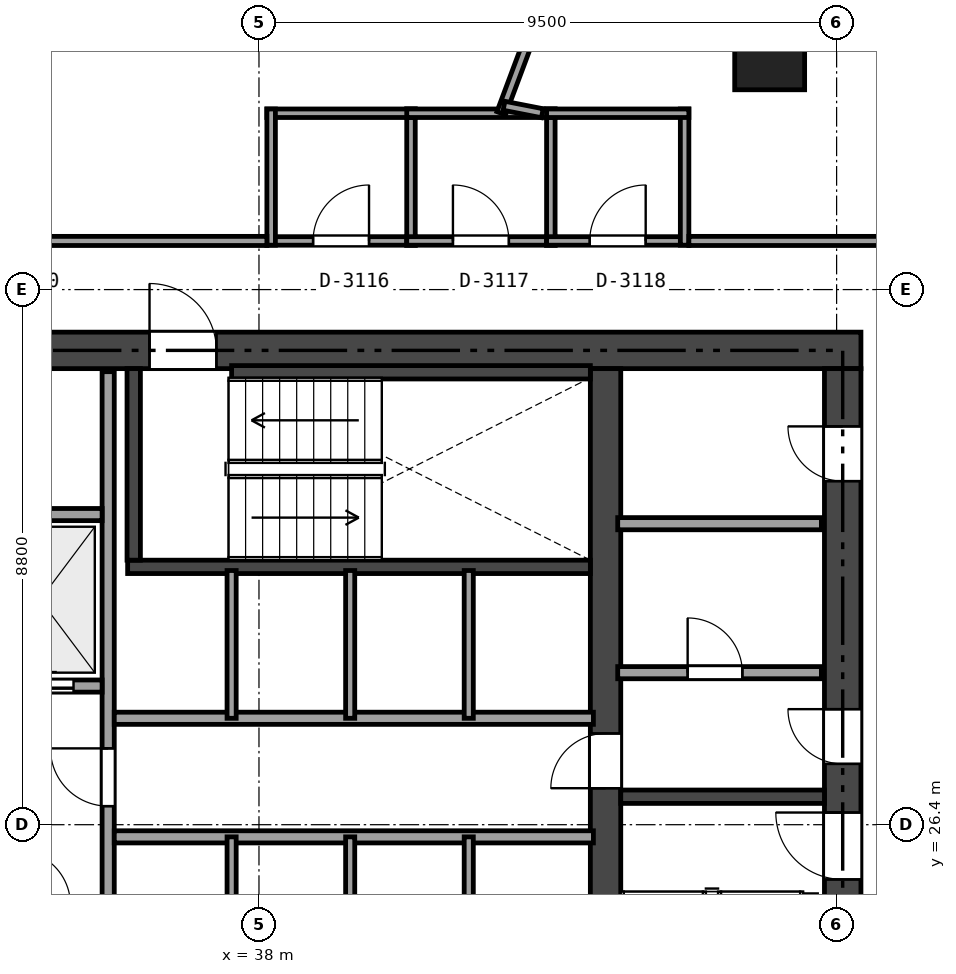
"""IFC4 building model, lengths in metres.
Left out: names, types, materials, properties, quantities, classifications, styles, units other than length and angle.
Written with IfcOpenShell. Run it as: python <this file> out.ifc"""

import sys

from ifc_helpers import new_model, si_unit, direction, frame, frame_2d, origin, origin_2d, place, context, subcontext, project, spatial, rectangle, extrude, element, fill, save


model = new_model("IFC4")
c1 = context("Model", 3, precision=1e-05, world=origin(), true_north=direction((0.0, 1.0)))
c2 = subcontext(c1, "Body", "Model", "MODEL_VIEW")
j1 = project(units=[si_unit("LENGTHUNIT", "METRE"), si_unit("PLANEANGLEUNIT", "RADIAN")], contexts=[c1])
p1 = place(None, origin())
s1 = spatial("IfcSite", under=j1, at=p1, CompositionType="ELEMENT")
p2 = place(p1, origin())
s2 = spatial("IfcBuilding", under=s1, at=p2, CompositionType="ELEMENT")
p3 = place(p2, frame((0.0, 0.0, 117.75)))
s3 = spatial("IfcBuildingStorey", under=s2, at=p3, CompositionType="ELEMENT", Elevation=117.75)
p4 = place(p3, frame((26.5, 34.2, 0.0), z_axis=(0.0, 0.0, 1.0), x_axis=(1.0, 0.0, 0.0)))
e1 = element("IfcWall", 1, at=p4, inside=s3, PredefinedType="SHEAR", context=c2, shape_type="SweptSolid", body=[
    extrude(rectangle(XDim=21.4, YDim=0.6, at=frame_2d((10.7, 0.0))), origin(), (0.0, 0.0, 1.0), 3.09),
])
p5 = place(p4, frame((9.7, 0.0, 0.0)))
e2 = element("IfcOpeningElement", 2, at=p5, cuts=e1, PredefinedType="OPENING", context=c2, shape_type="SweptSolid", body=[
    extrude(rectangle(XDim=1.1, YDim=2.15, at=frame_2d((0.55, 1.075))), frame((0.0, 0.31, 0.0), z_axis=(0.0, -1.0, 0.0), x_axis=(1.0, 0.0, 0.0)), (0.0, 0.0, 1.0), 0.62),
])
p6 = place(p4, frame((1.95, 0.0, 0.0)))
e3 = element("IfcOpeningElement", 3, at=p6, cuts=e1, PredefinedType="OPENING", context=c2, shape_type="SweptSolid", body=[
    extrude(rectangle(XDim=0.9, YDim=2.1, at=frame_2d((0.45, 1.05))), frame((0.0, 0.31, 0.0), z_axis=(0.0, -1.0, 0.0), x_axis=(1.0, 0.0, 0.0)), (0.0, 0.0, 1.0), 0.62),
])
p7 = place(p4, frame((6.25, 0.0, 0.0)))
e4 = element("IfcOpeningElement", 4, at=p7, cuts=e1, PredefinedType="OPENING", context=c2, shape_type="SweptSolid", body=[
    extrude(rectangle(XDim=0.9, YDim=2.1, at=frame_2d((0.45, 1.05))), frame((0.0, 0.31, 0.0), z_axis=(0.0, -1.0, 0.0), x_axis=(1.0, 0.0, 0.0)), (0.0, 0.0, 1.0), 0.62),
])
p8 = place(p3, frame((47.6, 18.9, 0.0), z_axis=(0.0, 0.0, 1.0), x_axis=(0.0, 1.0, 0.0)))
e5 = element("IfcWall", 5, at=p8, inside=s3, PredefinedType="SHEAR", context=c2, shape_type="SweptSolid", body=[
    extrude(rectangle(XDim=15.0, YDim=0.6, at=frame_2d((7.5, 0.0))), origin(), (0.0, 0.0, 1.0), 3.09),
])
p9 = place(p8, frame((6.6, 0.0, 0.0)))
e6 = element("IfcOpeningElement", 6, at=p9, cuts=e5, PredefinedType="OPENING", context=c2, shape_type="SweptSolid", body=[
    extrude(rectangle(XDim=1.1, YDim=2.15, at=frame_2d((0.55, 1.075))), frame((0.0, 0.31, 0.0), z_axis=(0.0, -1.0, 0.0), x_axis=(1.0, 0.0, 0.0)), (0.0, 0.0, 1.0), 0.62),
])
p10 = place(p8, frame((8.5, 0.0, 0.0)))
e7 = element("IfcOpeningElement", 7, at=p10, cuts=e5, PredefinedType="OPENING", context=c2, shape_type="SweptSolid", body=[
    extrude(rectangle(XDim=0.9, YDim=2.1, at=frame_2d((0.45, 1.05))), frame((0.0, 0.31, 0.0), z_axis=(0.0, -1.0, 0.0), x_axis=(1.0, 0.0, 0.0)), (0.0, 0.0, 1.0), 0.62),
])
p11 = place(p8, frame((13.15, 0.0, 0.0)))
e8 = element("IfcOpeningElement", 8, at=p11, cuts=e5, PredefinedType="OPENING", context=c2, shape_type="SweptSolid", body=[
    extrude(rectangle(XDim=0.9, YDim=2.1, at=frame_2d((0.45, 1.05))), frame((0.0, 0.31, 0.0), z_axis=(0.0, -1.0, 0.0), x_axis=(1.0, 0.0, 0.0)), (0.0, 0.0, 1.0), 0.62),
])
p12 = place(p3, frame((43.7, 18.9, 0.0), z_axis=(0.0, 0.0, 1.0), x_axis=(0.0, 1.0, 0.0)))
e9 = element("IfcWall", 9, at=p12, inside=s3, PredefinedType="SHEAR", context=c2, shape_type="SweptSolid", body=[
    extrude(rectangle(XDim=15.0, YDim=0.5, at=frame_2d((7.5, 0.0))), origin(), (0.0, 0.0, 1.0), 3.09),
])
p13 = place(p12, frame((8.1, 0.0, 0.0)))
e10 = element("IfcOpeningElement", 10, at=p13, cuts=e9, PredefinedType="OPENING", context=c2, shape_type="SweptSolid", body=[
    extrude(rectangle(XDim=0.9, YDim=2.1, at=frame_2d((0.45, 1.05))), frame((0.0, 0.26, 0.0), z_axis=(0.0, -1.0, 0.0), x_axis=(1.0, 0.0, 0.0)), (0.0, 0.0, 1.0), 0.52),
])
p14 = place(p3, frame((43.95, 26.86, 0.0), z_axis=(0.0, 0.0, 1.0), x_axis=(1.0, 0.0, 0.0)))
e11 = element("IfcWall", 11, at=p14, inside=s3, PredefinedType="SHEAR", context=c2, shape_type="SweptSolid", body=[
    extrude(rectangle(XDim=3.35, YDim=0.22, at=frame_2d((1.675, 0.0))), origin(), (0.0, 0.0, 1.0), 3.09),
])
p15 = place(p3, frame((35.84, 30.64, 0.0), z_axis=(0.0, 0.0, 1.0), x_axis=(1.0, 0.0, 0.0)))
e12 = element("IfcWall", 12, at=p15, inside=s3, PredefinedType="SHEAR", context=c2, shape_type="SweptSolid", body=[
    extrude(rectangle(XDim=7.61, YDim=0.22, at=frame_2d((3.805, 0.0))), origin(), (0.0, 0.0, 1.0), 3.09),
])
p16 = place(p3, frame((35.94, 30.75, 0.0), z_axis=(0.0, 0.0, 1.0), x_axis=(0.0, 1.0, 0.0)))
e13 = element("IfcWall", 13, at=p16, inside=s3, PredefinedType="SHEAR", context=c2, shape_type="SweptSolid", body=[
    extrude(rectangle(XDim=3.15, YDim=0.22, at=frame_2d((1.575, 0.0))), origin(), (0.0, 0.0, 1.0), 3.09),
])
p17 = place(p3, frame((37.55, 33.84, 0.0), z_axis=(0.0, 0.0, 1.0), x_axis=(1.0, 0.0, 0.0)))
e14 = element("IfcWall", 14, at=p17, inside=s3, PredefinedType="SHEAR", context=c2, shape_type="SweptSolid", body=[
    extrude(rectangle(XDim=5.9, YDim=0.22, at=frame_2d((2.95, 0.0))), origin(), (0.0, 0.0, 1.0), 3.09),
])
p18 = place(p3, frame((46.399, 39.061, 0.0), z_axis=(0.0, 0.0, 1.0), x_axis=(1.0, 0.0, 0.0)))
e15 = element("IfcColumn", 15, at=p18, inside=s3, PredefinedType="COLUMN", context=c2, shape_type="SweptSolid", body=[
    extrude(rectangle(XDim=1.15, YDim=1.15, at=origin_2d()), origin(), (0.0, 0.0, 1.0), 3.09),
])
p19 = place(p3, frame((43.9, 28.9, 0.0), z_axis=(0.0, 0.0, 1.0), x_axis=(1.0, 0.0, 0.0)))
e16 = element("IfcWall", 16, at=p19, inside=s3, PredefinedType="SOLIDWALL", context=c2, shape_type="SweptSolid", body=[
    extrude(rectangle(XDim=3.35, YDim=0.2, at=frame_2d((1.675, 0.0))), origin(), (0.0, 0.0, 1.0), 3.09),
])
p20 = place(p19, frame((1.15, 0.0, 0.0)))
e17 = element("IfcOpeningElement", 17, at=p20, cuts=e16, PredefinedType="OPENING", context=c2, shape_type="SweptSolid", body=[
    extrude(rectangle(XDim=0.9, YDim=2.1, at=frame_2d((0.45, 1.05))), frame((0.0, 0.11, 0.0), z_axis=(0.0, -1.0, 0.0), x_axis=(1.0, 0.0, 0.0)), (0.0, 0.0, 1.0), 0.22),
])
p21 = place(p3, frame((43.9, 31.35, 0.0), z_axis=(0.0, 0.0, 1.0), x_axis=(1.0, 0.0, 0.0)))
e18 = element("IfcWall", 18, at=p21, inside=s3, PredefinedType="SOLIDWALL", context=c2, shape_type="SweptSolid", body=[
    extrude(rectangle(XDim=3.35, YDim=0.2, at=frame_2d((1.675, 0.0))), origin(), (0.0, 0.0, 1.0), 3.09),
])
p22 = place(p3, frame((35.52, 18.95, 0.0), z_axis=(0.0, 0.0, 1.0), x_axis=(0.0, 1.0, 0.0)))
e19 = element("IfcWall", 19, at=p22, inside=s3, PredefinedType="SOLIDWALL", context=c2, shape_type="SweptSolid", body=[
    extrude(rectangle(XDim=14.9, YDim=0.2, at=frame_2d((7.45, 0.0))), origin(), (0.0, 0.0, 1.0), 2.611),
])
p23 = place(p22, frame((7.755, 0.0, 0.0)))
e20 = element("IfcOpeningElement", 20, at=p23, cuts=e19, PredefinedType="OPENING", context=c2, shape_type="SweptSolid", body=[
    extrude(rectangle(XDim=0.95, YDim=2.15, at=frame_2d((0.475, 1.075))), frame((0.0, 0.11, 0.0), z_axis=(0.0, -1.0, 0.0), x_axis=(1.0, 0.0, 0.0)), (0.0, 0.0, 1.0), 0.22),
])
p24 = place(p22, frame((0.6, 0.0, 0.0)))
e21 = element("IfcOpeningElement", 21, at=p24, cuts=e19, PredefinedType="OPENING", context=c2, shape_type="SweptSolid", body=[
    extrude(rectangle(XDim=0.9, YDim=2.1, at=frame_2d((0.45, 1.05))), frame((0.0, 0.11, 0.0), z_axis=(0.0, -1.0, 0.0), x_axis=(1.0, 0.0, 0.0)), (0.0, 0.0, 1.0), 0.22),
])
p25 = place(p3, frame((31.0, 28.68, 0.0), z_axis=(0.0, 0.0, 1.0), x_axis=(1.0, 0.0, 0.0)))
e22 = element("IfcWall", 22, at=p25, inside=s3, PredefinedType="SOLIDWALL", context=c2, shape_type="SweptSolid", body=[
    extrude(rectangle(XDim=4.42, YDim=0.2, at=frame_2d((2.21, 0.0))), origin(), (0.0, 0.0, 1.0), 3.09),
])
p26 = place(p25, frame((0.6, 0.0, 0.0)))
e23 = element("IfcOpeningElement", 23, at=p26, cuts=e22, PredefinedType="OPENING", context=c2, shape_type="SweptSolid", body=[
    extrude(rectangle(XDim=1.1, YDim=2.15, at=frame_2d((0.55, 1.075))), frame((0.0, 0.11, 0.0), z_axis=(0.0, -1.0, 0.0), x_axis=(1.0, 0.0, 0.0)), (0.0, 0.0, 1.0), 0.22),
])
p27 = place(p25, frame((2.85, 0.0, 0.0)))
e24 = element("IfcOpeningElement", 24, at=p27, cuts=e22, PredefinedType="OPENING", context=c2, shape_type="SweptSolid", body=[
    extrude(rectangle(XDim=1.1, YDim=2.15, at=frame_2d((0.55, 1.075))), frame((0.0, 0.11, 0.0), z_axis=(0.0, -1.0, 0.0), x_axis=(1.0, 0.0, 0.0)), (0.0, 0.0, 1.0), 0.22),
])
p28 = place(p3, frame((31.0, 31.5, 0.0), z_axis=(0.0, 0.0, 1.0), x_axis=(1.0, 0.0, 0.0)))
e25 = element("IfcWall", 25, at=p28, inside=s3, PredefinedType="SOLIDWALL", context=c2, shape_type="SweptSolid", body=[
    extrude(rectangle(XDim=4.42, YDim=0.2, at=frame_2d((2.21, 0.0))), origin(), (0.0, 0.0, 1.0), 3.09),
])
for number, where, z_axis, x_axis in (
    (26, (35.62, 28.15, 0.0), (0.0, 0.0, 1.0), (1.0, 0.0, 0.0)),
    (27, (35.62, 26.2, 0.0), (0.0, 0.0, 1.0), (1.0, 0.0, 0.0)),
):
    element("IfcWall", number, at=place(p3, frame(where, z_axis=z_axis, x_axis=x_axis)), inside=s3, PredefinedType="SOLIDWALL", context=c2, shape_type="SweptSolid", body=[
        extrude(rectangle(XDim=7.88, YDim=0.2, at=frame_2d((3.94, 0.0))), origin(), (0.0, 0.0, 1.0), 3.09),
    ])
for number, where, z_axis, x_axis in (
    (28, (37.55, 28.15, 0.0), (0.0, 0.0, 1.0), (0.0, 1.0, 0.0)),
    (29, (39.5, 28.15, 0.0), (0.0, 0.0, 1.0), (0.0, 1.0, 0.0)),
    (30, (41.45, 28.15, 0.0), (0.0, 0.0, 1.0), (0.0, 1.0, 0.0)),
):
    element("IfcWall", number, at=place(p3, frame(where, z_axis=z_axis, x_axis=x_axis)), inside=s3, PredefinedType="PARTITIONING", context=c2, shape_type="SweptSolid", body=[
        extrude(rectangle(XDim=2.43, YDim=0.15, at=frame_2d((1.215, 0.0))), origin(), (0.0, 0.0, 1.0), 3.09),
    ])
for number, where, z_axis, x_axis in (
    (31, (37.55, 23.65, 0.0), (0.0, 0.0, 1.0), (0.0, 1.0, 0.0)),
    (32, (39.5, 23.65, 0.0), (0.0, 0.0, 1.0), (0.0, 1.0, 0.0)),
    (33, (41.45, 23.65, 0.0), (0.0, 0.0, 1.0), (0.0, 1.0, 0.0)),
):
    element("IfcWall", number, at=place(p3, frame(where, z_axis=z_axis, x_axis=x_axis)), inside=s3, PredefinedType="PARTITIONING", context=c2, shape_type="SweptSolid", body=[
        extrude(rectangle(XDim=2.55, YDim=0.15, at=frame_2d((1.275, 0.0))), origin(), (0.0, 0.0, 1.0), 2.611),
    ])
p29 = place(p3, frame((38.13, 36.0, 0.0), z_axis=(0.0, 0.0, 1.0), x_axis=(1.0, 0.0, 0.0)))
e34 = element("IfcWall", 34, at=p29, inside=s3, PredefinedType="PARTITIONING", context=c2, shape_type="SweptSolid", body=[
    extrude(rectangle(XDim=2.44, YDim=0.14, at=frame_2d((1.22, 0.0))), origin(), (0.0, 0.0, 1.0), 3.09),
])
p30 = place(p29, frame((0.76, 0.0, 0.0)))
e35 = element("IfcOpeningElement", 35, at=p30, cuts=e34, PredefinedType="OPENING", context=c2, shape_type="SweptSolid", body=[
    extrude(rectangle(XDim=0.92, YDim=2.1, at=frame_2d((0.46, 1.05))), frame((0.0, 0.08, 0.0), z_axis=(0.0, -1.0, 0.0), x_axis=(1.0, 0.0, 0.0)), (0.0, 0.0, 1.0), 0.16),
])
p31 = place(p3, frame((40.5, 35.93, 0.0), z_axis=(0.0, 0.0, 1.0), x_axis=(0.0, 1.0, 0.0)))
e36 = element("IfcWall", 36, at=p31, inside=s3, PredefinedType="PARTITIONING", context=c2, shape_type="SweptSolid", body=[
    extrude(rectangle(XDim=2.24, YDim=0.14, at=frame_2d((1.12, 0.0))), origin(), (0.0, 0.0, 1.0), 2.763),
])
p32 = place(p3, frame((40.57, 38.1, 0.0), z_axis=(0.0, 0.0, 1.0), x_axis=(-1.0, 0.0, 0.0)))
e37 = element("IfcWall", 37, at=p32, inside=s3, PredefinedType="PARTITIONING", context=c2, shape_type="SweptSolid", body=[
    extrude(rectangle(XDim=2.44, YDim=0.14, at=frame_2d((1.22, 0.0))), origin(), (0.0, 0.0, 1.0), 3.09),
])
p33 = place(p3, frame((38.2, 38.17, 0.0), z_axis=(0.0, 0.0, 1.0), x_axis=(0.0, -1.0, 0.0)))
e38 = element("IfcWall", 38, at=p33, inside=s3, PredefinedType="PARTITIONING", context=c2, shape_type="SweptSolid", body=[
    extrude(rectangle(XDim=2.24, YDim=0.14, at=frame_2d((1.12, 0.0))), origin(), (0.0, 0.0, 1.0), 2.763),
])
p34 = place(p3, frame((40.43, 36.0, 0.0), z_axis=(0.0, 0.0, 1.0), x_axis=(1.0, 0.0, 0.0)))
e39 = element("IfcWall", 39, at=p34, inside=s3, PredefinedType="PARTITIONING", context=c2, shape_type="SweptSolid", body=[
    extrude(rectangle(XDim=2.44, YDim=0.14, at=frame_2d((1.22, 0.0))), origin(), (0.0, 0.0, 1.0), 2.763),
])
p35 = place(p34, frame((0.76, 0.0, 0.0)))
e40 = element("IfcOpeningElement", 40, at=p35, cuts=e39, PredefinedType="OPENING", context=c2, shape_type="SweptSolid", body=[
    extrude(rectangle(XDim=0.92, YDim=2.1, at=frame_2d((0.46, 1.05))), frame((0.0, 0.08, 0.0), z_axis=(0.0, -1.0, 0.0), x_axis=(1.0, 0.0, 0.0)), (0.0, 0.0, 1.0), 0.16),
])
p36 = place(p3, frame((42.8, 35.93, 0.0), z_axis=(0.0, 0.0, 1.0), x_axis=(0.0, 1.0, 0.0)))
e41 = element("IfcWall", 41, at=p36, inside=s3, PredefinedType="PARTITIONING", context=c2, shape_type="SweptSolid", body=[
    extrude(rectangle(XDim=2.24, YDim=0.14, at=frame_2d((1.12, 0.0))), origin(), (0.0, 0.0, 1.0), 2.667),
])
p37 = place(p3, frame((42.87, 38.1, 0.0), z_axis=(0.0, 0.0, 1.0), x_axis=(-1.0, 0.0, 0.0)))
e42 = element("IfcWall", 42, at=p37, inside=s3, PredefinedType="PARTITIONING", context=c2, shape_type="SweptSolid", body=[
    extrude(rectangle(XDim=2.44, YDim=0.14, at=frame_2d((1.22, 0.0))), origin(), (0.0, 0.0, 1.0), 2.667),
])
p38 = place(p3, frame((42.73, 36.0, 0.0), z_axis=(0.0, 0.0, 1.0), x_axis=(1.0, 0.0, 0.0)))
e43 = element("IfcWall", 43, at=p38, inside=s3, PredefinedType="PARTITIONING", context=c2, shape_type="SweptSolid", body=[
    extrude(rectangle(XDim=2.34, YDim=0.14, at=frame_2d((1.17, 0.0))), origin(), (0.0, 0.0, 1.0), 2.387),
])
p39 = place(p38, frame((0.71, 0.0, 0.0)))
e44 = element("IfcOpeningElement", 44, at=p39, cuts=e43, PredefinedType="OPENING", context=c2, shape_type="SweptSolid", body=[
    extrude(rectangle(XDim=0.92, YDim=2.1, at=frame_2d((0.46, 1.05))), frame((0.0, 0.08, 0.0), z_axis=(0.0, -1.0, 0.0), x_axis=(1.0, 0.0, 0.0)), (0.0, 0.0, 1.0), 0.16),
])
p40 = place(p3, frame((45.0, 35.93, 0.0), z_axis=(0.0, 0.0, 1.0), x_axis=(0.0, 1.0, 0.0)))
e45 = element("IfcWall", 45, at=p40, inside=s3, PredefinedType="PARTITIONING", context=c2, shape_type="SweptSolid", body=[
    extrude(rectangle(XDim=2.24, YDim=0.14, at=frame_2d((1.12, 0.0))), origin(), (0.0, 0.0, 1.0), 2.387),
])
p41 = place(p3, frame((45.07, 38.1, 0.0), z_axis=(0.0, 0.0, 1.0), x_axis=(-1.0, 0.0, 0.0)))
e46 = element("IfcWall", 46, at=p41, inside=s3, PredefinedType="PARTITIONING", context=c2, shape_type="SweptSolid", body=[
    extrude(rectangle(XDim=2.34, YDim=0.14, at=frame_2d((1.17, 0.0))), origin(), (0.0, 0.0, 1.0), 2.667),
])
p42 = place(p3, frame((44.919, 45.942, 0.0), z_axis=(0.0, 0.0, 1.0), x_axis=(-0.350535422713, -0.936549474093, 0.0)))
e47 = element("IfcWall", 47, at=p42, inside=s3, PredefinedType="PARTITIONING", context=c2, shape_type="SweptSolid", body=[
    extrude(rectangle(XDim=8.373, YDim=0.15, at=frame_2d((4.187, 0.0))), origin(), (0.0, 0.0, 1.0), 2.375),
])
p43 = place(p3, frame((42.03, 38.223, 0.0), z_axis=(0.0, 0.0, 1.0), x_axis=(0.981520230149, -0.191358401459, 0.0)))
e48 = element("IfcWall", 48, at=p43, inside=s3, PredefinedType="PARTITIONING", context=c2, shape_type="SweptSolid", body=[
    extrude(rectangle(XDim=0.642, YDim=0.15, at=frame_2d((0.321, 0.0))), origin(), (0.0, 0.0, 1.0), 2.667),
])
p44 = place(p3, frame((45.07, 36.0, 0.0), z_axis=(0.0, 0.0, 1.0), x_axis=(1.0, 0.0, 0.0)))
e49 = element("IfcWall", 49, at=p44, inside=s3, PredefinedType="PARTITIONING", context=c2, shape_type="SweptSolid", body=[
    extrude(rectangle(XDim=4.33, YDim=0.15, at=frame_2d((2.165, 0.0))), origin(), (0.0, 0.0, 1.0), 2.375),
])
p45 = place(p3, frame((29.7, 36.0, 0.0), z_axis=(0.0, 0.0, 1.0), x_axis=(1.0, 0.0, 0.0)))
e50 = element("IfcWall", 50, at=p45, inside=s3, PredefinedType="PARTITIONING", context=c2, shape_type="SweptSolid", body=[
    extrude(rectangle(XDim=8.43, YDim=0.15, at=frame_2d((4.215, 0.0))), origin(), (0.0, 0.0, 1.0), 2.387),
])
p46 = place(p45, frame((3.74, 0.0, 0.0)))
e51 = element("IfcOpeningElement", 51, at=p46, cuts=e50, PredefinedType="OPENING", context=c2, shape_type="SweptSolid", body=[
    extrude(rectangle(XDim=0.95, YDim=2.15, at=frame_2d((0.475, 1.075))), frame((0.0, 0.085, 0.0), z_axis=(0.0, -1.0, 0.0), x_axis=(1.0, 0.0, 0.0)), (0.0, 0.0, 1.0), 0.17),
])
p47 = place(p9, origin())
e52 = element("IfcDoor", 52, at=p47, inside=s3, OperationType="SINGLE_SWING_RIGHT", PredefinedType="DOOR", context=c2, shape_type="SweptSolid", body=[
    extrude(rectangle(XDim=1.1, YDim=2.15, at=frame_2d((0.55, 1.075))), frame((0.0, 0.025, 0.0), z_axis=(0.0, -1.0, 0.0), x_axis=(1.0, 0.0, 0.0)), (0.0, 0.0, 1.0), 0.05),
])
fill(e6, e52)
p48 = place(p5, origin())
e53 = element("IfcDoor", 53, at=p48, inside=s3, OperationType="SINGLE_SWING_LEFT", PredefinedType="DOOR", context=c2, shape_type="SweptSolid", body=[
    extrude(rectangle(XDim=1.1, YDim=2.15, at=frame_2d((0.55, 1.075))), frame((0.0, 0.025, 0.0), z_axis=(0.0, -1.0, 0.0), x_axis=(1.0, 0.0, 0.0)), (0.0, 0.0, 1.0), 0.05),
])
fill(e2, e53)
p49 = place(p23, origin())
e54 = element("IfcDoor", 54, at=p49, inside=s3, OperationType="SINGLE_SWING_RIGHT", PredefinedType="DOOR", context=c2, shape_type="SweptSolid", body=[
    extrude(rectangle(XDim=0.95, YDim=2.15, at=frame_2d((0.475, 1.075))), frame((0.0, 0.025, 0.0), z_axis=(0.0, -1.0, 0.0), x_axis=(1.0, 0.0, 0.0)), (0.0, 0.0, 1.0), 0.05),
])
fill(e20, e54)
p50 = place(p13, origin())
e55 = element("IfcDoor", 55, at=p50, inside=s3, OperationType="SINGLE_SWING_LEFT", PredefinedType="DOOR", context=c2, shape_type="SweptSolid", body=[
    extrude(rectangle(XDim=0.9, YDim=2.1, at=frame_2d((0.45, 1.05))), frame((0.0, 0.025, 0.0), z_axis=(0.0, -1.0, 0.0), x_axis=(1.0, 0.0, 0.0)), (0.0, 0.0, 1.0), 0.05),
])
fill(e10, e55)
p51 = place(p10, origin())
e56 = element("IfcDoor", 56, at=p51, inside=s3, OperationType="SINGLE_SWING_RIGHT", PredefinedType="DOOR", context=c2, shape_type="SweptSolid", body=[
    extrude(rectangle(XDim=0.9, YDim=2.1, at=frame_2d((0.45, 1.05))), frame((0.0, 0.025, 0.0), z_axis=(0.0, -1.0, 0.0), x_axis=(1.0, 0.0, 0.0)), (0.0, 0.0, 1.0), 0.05),
])
fill(e7, e56)
p52 = place(p20, origin())
e57 = element("IfcDoor", 57, at=p52, inside=s3, OperationType="SINGLE_SWING_LEFT", PredefinedType="DOOR", context=c2, shape_type="SweptSolid", body=[
    extrude(rectangle(XDim=0.9, YDim=2.1, at=frame_2d((0.45, 1.05))), frame((0.0, 0.025, 0.0), z_axis=(0.0, -1.0, 0.0), x_axis=(1.0, 0.0, 0.0)), (0.0, 0.0, 1.0), 0.05),
])
fill(e17, e57)
p53 = place(p11, origin())
e58 = element("IfcDoor", 58, at=p53, inside=s3, OperationType="SINGLE_SWING_RIGHT", PredefinedType="DOOR", context=c2, shape_type="SweptSolid", body=[
    extrude(rectangle(XDim=0.9, YDim=2.1, at=frame_2d((0.45, 1.05))), frame((0.0, 0.025, 0.0), z_axis=(0.0, -1.0, 0.0), x_axis=(1.0, 0.0, 0.0)), (0.0, 0.0, 1.0), 0.05),
])
fill(e8, e58)
p54 = place(p27, origin())
e59 = element("IfcDoor", 59, at=p54, inside=s3, OperationType="SLIDING_TO_LEFT", PredefinedType="DOOR", context=c2, shape_type="SweptSolid", body=[
    extrude(rectangle(XDim=1.1, YDim=2.15, at=frame_2d((0.55, 1.075))), frame((0.0, 0.025, 0.0), z_axis=(0.0, -1.0, 0.0), x_axis=(1.0, 0.0, 0.0)), (0.0, 0.0, 1.0), 0.05),
])
fill(e24, e59)
p55 = place(p30, origin())
e60 = element("IfcDoor", 60, at=p55, inside=s3, OperationType="SINGLE_SWING_RIGHT", PredefinedType="DOOR", context=c2, shape_type="SweptSolid", body=[
    extrude(rectangle(XDim=0.92, YDim=2.1, at=frame_2d((0.46, 1.05))), frame((0.0, 0.025, 0.0), z_axis=(0.0, -1.0, 0.0), x_axis=(1.0, 0.0, 0.0)), (0.0, 0.0, 1.0), 0.05),
])
fill(e35, e60)
p56 = place(p35, origin())
e61 = element("IfcDoor", 61, at=p56, inside=s3, OperationType="SINGLE_SWING_LEFT", PredefinedType="DOOR", context=c2, shape_type="SweptSolid", body=[
    extrude(rectangle(XDim=0.92, YDim=2.1, at=frame_2d((0.46, 1.05))), frame((0.0, 0.025, 0.0), z_axis=(0.0, -1.0, 0.0), x_axis=(1.0, 0.0, 0.0)), (0.0, 0.0, 1.0), 0.05),
])
fill(e40, e61)
p57 = place(p39, origin())
e62 = element("IfcDoor", 62, at=p57, inside=s3, OperationType="SINGLE_SWING_RIGHT", PredefinedType="DOOR", context=c2, shape_type="SweptSolid", body=[
    extrude(rectangle(XDim=0.92, YDim=2.1, at=frame_2d((0.46, 1.05))), frame((0.0, 0.025, 0.0), z_axis=(0.0, -1.0, 0.0), x_axis=(1.0, 0.0, 0.0)), (0.0, 0.0, 1.0), 0.05),
])
fill(e44, e62)
save(model, sys.argv[1])
